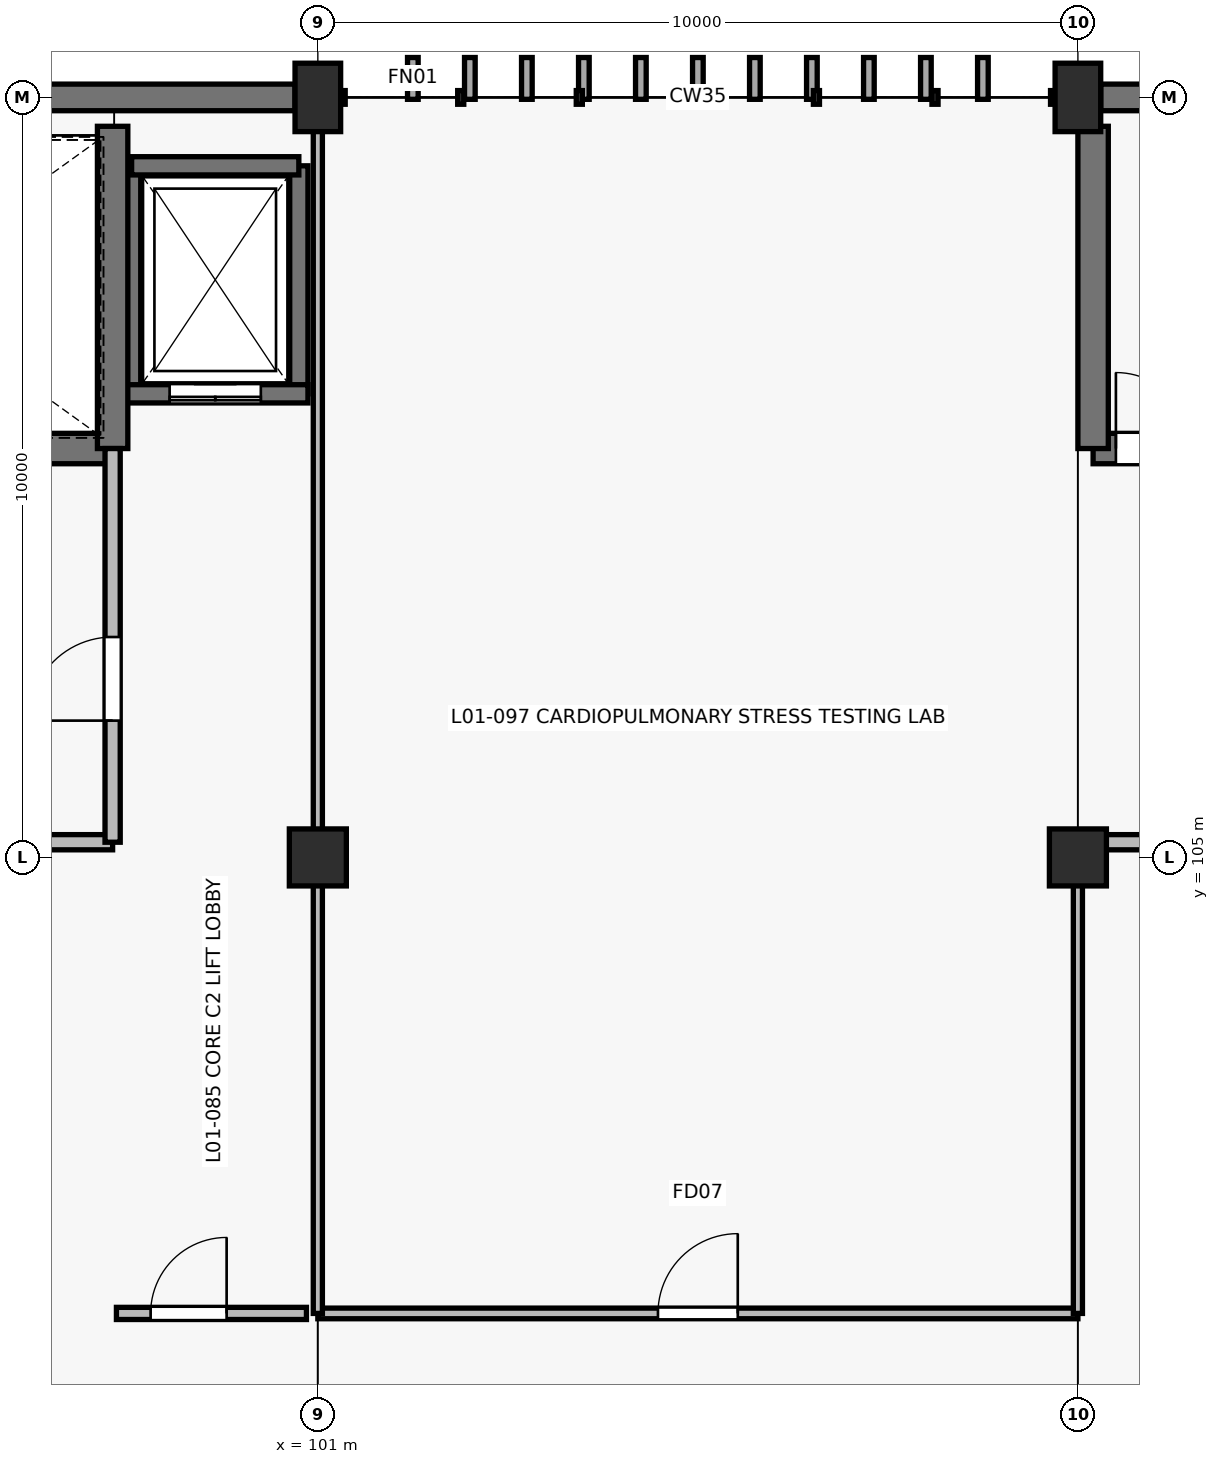
"""IFC4 building model, lengths in metres.
Left out: names, types, materials, properties, quantities, classifications, styles, units other than length and angle.
Written with IfcOpenShell. Run it as: python <this file> out.ifc"""

import sys

from ifc_helpers import new_model, si_unit, direction, frame, frame_2d, origin, origin_2d, place, context, subcontext, project, spatial, rectangle, extrude, element, fill, save


model = new_model("IFC4")
c1 = context("Model", 3, precision=1e-05, world=origin(), true_north=direction((0.0, 1.0)))
c2 = subcontext(c1, "Body", "Model", "MODEL_VIEW")
j1 = project(units=[si_unit("LENGTHUNIT", "METRE"), si_unit("PLANEANGLEUNIT", "RADIAN")], contexts=[c1])
p1 = place(None, origin())
s1 = spatial("IfcSite", under=j1, at=p1, CompositionType="ELEMENT")
p2 = place(p1, origin())
s2 = spatial("IfcBuilding", under=s1, at=p2, CompositionType="ELEMENT")
p3 = place(p2, frame((0.0, 0.0, 4.8)))
s3 = spatial("IfcBuildingStorey", under=s2, at=p3, CompositionType="ELEMENT", Elevation=4.8)
p4 = place(p3, frame((101.0, 105.0, 0.0), z_axis=(0.0, 0.0, 1.0), x_axis=(1.0, 0.0, 0.0)))
e1 = element("IfcColumn", 1, at=p4, inside=s3, PredefinedType="COLUMN", context=c2, shape_type="SweptSolid", body=[
    extrude(rectangle(XDim=0.75, YDim=0.75, at=origin_2d()), origin(), (0.0, 0.0, 1.0), 4.2),
])
p5 = place(p3, frame((101.0, 115.0, 0.0), z_axis=(0.0, 0.0, 1.0), x_axis=(1.0, 0.0, 0.0)))
e2 = element("IfcColumn", 2, at=p5, inside=s3, PredefinedType="COLUMN", context=c2, shape_type="SweptSolid", body=[
    extrude(rectangle(XDim=0.6, YDim=0.9, at=origin_2d()), origin(), (0.0, 0.0, 1.0), 4.2),
])
p6 = place(p3, frame((111.0, 105.0, 0.0), z_axis=(0.0, 0.0, 1.0), x_axis=(1.0, 0.0, 0.0)))
e3 = element("IfcColumn", 3, at=p6, inside=s3, PredefinedType="COLUMN", context=c2, shape_type="SweptSolid", body=[
    extrude(rectangle(XDim=0.75, YDim=0.75, at=origin_2d()), origin(), (0.0, 0.0, 1.0), 4.2),
])
p7 = place(p3, frame((111.0, 115.0, 0.0), z_axis=(0.0, 0.0, 1.0), x_axis=(1.0, 0.0, 0.0)))
e4 = element("IfcColumn", 4, at=p7, inside=s3, PredefinedType="COLUMN", context=c2, shape_type="SweptSolid", body=[
    extrude(rectangle(XDim=0.6, YDim=0.9, at=origin_2d()), origin(), (0.0, 0.0, 1.0), 4.2),
])
p8 = place(p3, frame((91.3, 115.0, 0.0), z_axis=(0.0, 0.0, 1.0), x_axis=(1.0, 0.0, 0.0)))
e5 = element("IfcWall", 5, at=p8, inside=s3, PredefinedType="SOLIDWALL", context=c2, shape_type="SweptSolid", body=[
    extrude(rectangle(XDim=9.4, YDim=0.35, at=frame_2d((4.7, 0.0))), origin(), (0.0, 0.0, 1.0), 4.2),
])
p9 = place(p8, frame((2.2, 0.0, 1.0)))
e6 = element("IfcOpeningElement", 6, at=p9, cuts=e5, PredefinedType="OPENING", context=c2, shape_type="SweptSolid", body=[
    extrude(rectangle(XDim=2.7, YDim=1.5, at=frame_2d((1.35, 0.75))), frame((0.0, 0.185, 0.0), z_axis=(0.0, -1.0, 0.0), x_axis=(1.0, 0.0, 0.0)), (0.0, 0.0, 1.0), 0.37),
])
p10 = place(p3, frame((111.3, 115.0, 0.0), z_axis=(0.0, 0.0, 1.0), x_axis=(1.0, 0.0, 0.0)))
e7 = element("IfcWall", 7, at=p10, inside=s3, PredefinedType="SOLIDWALL", context=c2, shape_type="SweptSolid", body=[
    extrude(rectangle(XDim=9.4, YDim=0.35, at=frame_2d((4.7, 0.0))), origin(), (0.0, 0.0, 1.0), 4.2),
])
p11 = place(p10, frame((2.2, 0.0, 1.0)))
e8 = element("IfcOpeningElement", 8, at=p11, cuts=e7, PredefinedType="OPENING", context=c2, shape_type="SweptSolid", body=[
    extrude(rectangle(XDim=1.5, YDim=1.8, at=frame_2d((0.75, 0.9))), frame((0.0, 0.185, 0.0), z_axis=(0.0, -1.0, 0.0), x_axis=(1.0, 0.0, 0.0)), (0.0, 0.0, 1.0), 0.37),
])
for number, where, z_axis, x_axis in (
    (9, (98.55, 111.1, 0.0), (0.0, 0.0, 1.0), (0.0, 1.0, 0.0)),
    (10, (100.75, 114.1, 0.0), (0.0, 0.0, 1.0), (0.0, -1.0, 0.0)),
):
    element("IfcWall", number, at=place(p3, frame(where, z_axis=z_axis, x_axis=x_axis)), inside=s3, PredefinedType="SHEAR", context=c2, shape_type="SweptSolid", body=[
        extrude(rectangle(XDim=3.0, YDim=0.24, at=frame_2d((1.5, 0.0))), origin(), (0.0, 0.0, 1.0), 4.2),
    ])
p12 = place(p3, frame((98.55, 114.1, 0.0), z_axis=(0.0, 0.0, 1.0), x_axis=(1.0, 0.0, 0.0)))
e11 = element("IfcWall", 11, at=p12, inside=s3, PredefinedType="SHEAR", context=c2, shape_type="SweptSolid", body=[
    extrude(rectangle(XDim=2.2, YDim=0.24, at=frame_2d((1.1, 0.0))), origin(), (0.0, 0.0, 1.0), 4.2),
])
p13 = place(p3, frame((100.87, 111.1, 0.0), z_axis=(0.0, 0.0, 1.0), x_axis=(-1.0, 0.0, 0.0)))
e12 = element("IfcWall", 12, at=p13, inside=s3, PredefinedType="SHEAR", context=c2, shape_type="SweptSolid", body=[
    extrude(rectangle(XDim=2.44, YDim=0.24, at=frame_2d((1.22, 0.0))), origin(), (0.0, 0.0, 1.0), 4.2),
])
p14 = place(p13, frame((0.62, 0.0, 0.0)))
e13 = element("IfcOpeningElement", 13, at=p14, cuts=e12, PredefinedType="OPENING", context=c2, shape_type="SweptSolid", body=[
    extrude(rectangle(XDim=1.2, YDim=2.15, at=frame_2d((0.6, 1.075))), frame((0.0, 0.13, 0.0), z_axis=(0.0, -1.0, 0.0), x_axis=(1.0, 0.0, 0.0)), (0.0, 0.0, 1.0), 0.26),
])
p15 = place(p3, frame((91.2, 110.38, 0.0), z_axis=(0.0, 0.0, 1.0), x_axis=(1.0, 0.0, 0.0)))
e14 = element("IfcWall", 14, at=p15, inside=s3, PredefinedType="SHEAR", context=c2, shape_type="SweptSolid", body=[
    extrude(rectangle(XDim=7.1, YDim=0.4, at=frame_2d((3.55, 0.0))), origin(), (0.0, 0.0, 1.0), 4.2),
])
p16 = place(p15, frame((0.3, 0.0, 0.0)))
e15 = element("IfcOpeningElement", 15, at=p16, cuts=e14, PredefinedType="OPENING", context=c2, shape_type="SweptSolid", body=[
    extrude(rectangle(XDim=1.0, YDim=2.15, at=frame_2d((0.5, 1.075))), frame((0.0, 0.21, 0.0), z_axis=(0.0, -1.0, 0.0), x_axis=(1.0, 0.0, 0.0)), (0.0, 0.0, 1.0), 0.42),
])
p17 = place(p3, frame((98.3, 110.38, 0.0), z_axis=(0.0, 0.0, 1.0), x_axis=(0.0, 1.0, 0.0)))
e16 = element("IfcWall", 16, at=p17, inside=s3, PredefinedType="SHEAR", context=c2, shape_type="SweptSolid", body=[
    extrude(rectangle(XDim=4.24, YDim=0.4, at=frame_2d((2.12, 0.0))), origin(), (0.0, 0.0, 1.0), 4.2),
])
p18 = place(p3, frame((91.2, 105.2, 0.0), z_axis=(0.0, 0.0, 1.0), x_axis=(1.0, 0.0, 0.0)))
e17 = element("IfcWall", 17, at=p18, inside=s3, PredefinedType="PARTITIONING", context=c2, shape_type="SweptSolid", body=[
    extrude(rectangle(XDim=7.1, YDim=0.2, at=frame_2d((3.55, 0.0))), origin(), (0.0, 0.0, 1.0), 2.925),
])
p19 = place(p18, frame((2.2, 0.0, 0.0)))
e18 = element("IfcOpeningElement", 18, at=p19, cuts=e17, PredefinedType="OPENING", context=c2, shape_type="SweptSolid", body=[
    extrude(rectangle(XDim=1.6, YDim=2.2, at=frame_2d((0.8, 1.1))), frame((0.0, 0.11, 0.0), z_axis=(0.0, -1.0, 0.0), x_axis=(1.0, 0.0, 0.0)), (0.0, 0.0, 1.0), 0.22),
])
p20 = place(p3, frame((98.3, 105.2, 0.0), z_axis=(0.0, 0.0, 1.0), x_axis=(0.0, 1.0, 0.0)))
e19 = element("IfcWall", 19, at=p20, inside=s3, PredefinedType="PARTITIONING", context=c2, shape_type="SweptSolid", body=[
    extrude(rectangle(XDim=5.18, YDim=0.2, at=frame_2d((2.59, 0.0))), origin(), (0.0, 0.0, 1.0), 3.025),
])
p21 = place(p20, frame((1.6, 0.0, 0.0)))
e20 = element("IfcOpeningElement", 20, at=p21, cuts=e19, PredefinedType="OPENING", context=c2, shape_type="SweptSolid", body=[
    extrude(rectangle(XDim=1.1, YDim=2.15, at=frame_2d((0.55, 1.075))), frame((0.0, 0.11, 0.0), z_axis=(0.0, -1.0, 0.0), x_axis=(1.0, 0.0, 0.0)), (0.0, 0.0, 1.0), 0.22),
])
p22 = place(p3, frame((98.35, 99.0, 0.0), z_axis=(0.0, 0.0, 1.0), x_axis=(1.0, 0.0, 0.0)))
e21 = element("IfcWall", 21, at=p22, inside=s3, PredefinedType="PARTITIONING", context=c2, shape_type="SweptSolid", body=[
    extrude(rectangle(XDim=2.5, YDim=0.16, at=frame_2d((1.25, 0.0))), origin(), (0.0, 0.0, 1.0), 2.925),
])
p23 = place(p22, frame((0.45, 0.0, 0.0)))
e22 = element("IfcOpeningElement", 22, at=p23, cuts=e21, PredefinedType="OPENING", context=c2, shape_type="SweptSolid", body=[
    extrude(rectangle(XDim=1.0, YDim=2.15, at=frame_2d((0.5, 1.075))), frame((0.0, 0.09, 0.0), z_axis=(0.0, -1.0, 0.0), x_axis=(1.0, 0.0, 0.0)), (0.0, 0.0, 1.0), 0.18),
])
p24 = place(p3, frame((111.2, 110.38, 0.0), z_axis=(0.0, 0.0, 1.0), x_axis=(1.0, 0.0, 0.0)))
e23 = element("IfcWall", 23, at=p24, inside=s3, PredefinedType="SHEAR", context=c2, shape_type="SweptSolid", body=[
    extrude(rectangle(XDim=7.1, YDim=0.4, at=frame_2d((3.55, 0.0))), origin(), (0.0, 0.0, 1.0), 4.2),
])
p25 = place(p24, frame((0.3, 0.0, 0.0)))
e24 = element("IfcOpeningElement", 24, at=p25, cuts=e23, PredefinedType="OPENING", context=c2, shape_type="SweptSolid", body=[
    extrude(rectangle(XDim=1.0, YDim=2.15, at=frame_2d((0.5, 1.075))), frame((0.0, 0.21, 0.0), z_axis=(0.0, -1.0, 0.0), x_axis=(1.0, 0.0, 0.0)), (0.0, 0.0, 1.0), 0.42),
])
p26 = place(p3, frame((111.2, 114.62, 0.0), z_axis=(0.0, 0.0, 1.0), x_axis=(0.0, -1.0, 0.0)))
e25 = element("IfcWall", 25, at=p26, inside=s3, PredefinedType="SHEAR", context=c2, shape_type="SweptSolid", body=[
    extrude(rectangle(XDim=4.24, YDim=0.4, at=frame_2d((2.12, 0.0))), origin(), (0.0, 0.0, 1.0), 4.2),
])
p27 = place(p3, frame((111.2, 105.2, 0.0), z_axis=(0.0, 0.0, 1.0), x_axis=(1.0, 0.0, 0.0)))
e26 = element("IfcWall", 26, at=p27, inside=s3, PredefinedType="PARTITIONING", context=c2, shape_type="SweptSolid", body=[
    extrude(rectangle(XDim=7.1, YDim=0.2, at=frame_2d((3.55, 0.0))), origin(), (0.0, 0.0, 1.0), 2.925),
])
p28 = place(p27, frame((2.2, 0.0, 0.0)))
e27 = element("IfcOpeningElement", 27, at=p28, cuts=e26, PredefinedType="OPENING", context=c2, shape_type="SweptSolid", body=[
    extrude(rectangle(XDim=1.6, YDim=2.2, at=frame_2d((0.8, 1.1))), frame((0.0, 0.11, 0.0), z_axis=(0.0, -1.0, 0.0), x_axis=(1.0, 0.0, 0.0)), (0.0, 0.0, 1.0), 0.22),
])
p29 = place(p3, frame((101.0, 99.0, 0.0), z_axis=(0.0, 0.0, 1.0), x_axis=(1.0, 0.0, 0.0)))
e28 = element("IfcWall", 28, at=p29, inside=s3, PredefinedType="PARTITIONING", context=c2, shape_type="SweptSolid", body=[
    extrude(rectangle(XDim=10.0, YDim=0.14, at=frame_2d((5.0, 0.0))), origin(), (0.0, 0.0, 1.0), 2.925),
])
p30 = place(p29, frame((4.475, 0.0, 0.0)))
e29 = element("IfcOpeningElement", 29, at=p30, cuts=e28, PredefinedType="OPENING", context=c2, shape_type="SweptSolid", body=[
    extrude(rectangle(XDim=1.05, YDim=2.1, at=frame_2d((0.525, 1.05))), frame((0.0, 0.08, 0.0), z_axis=(0.0, -1.0, 0.0), x_axis=(1.0, 0.0, 0.0)), (0.0, 0.0, 1.0), 0.16),
])
p31 = place(p3, frame((101.0, 99.0, 0.0), z_axis=(0.0, 0.0, 1.0), x_axis=(0.0, 1.0, 0.0)))
e30 = element("IfcWall", 30, at=p31, inside=s3, PredefinedType="PARTITIONING", context=c2, shape_type="SweptSolid", body=[
    extrude(rectangle(XDim=15.75, YDim=0.12, at=frame_2d((7.875, 0.0))), origin(), (0.0, 0.0, 1.0), 2.925),
])
p32 = place(p3, frame((111.0, 99.0, 0.0), z_axis=(0.0, 0.0, 1.0), x_axis=(0.0, 1.0, 0.0)))
e31 = element("IfcWall", 31, at=p32, inside=s3, PredefinedType="PARTITIONING", context=c2, shape_type="SweptSolid", body=[
    extrude(rectangle(XDim=6.2, YDim=0.12, at=frame_2d((3.1, 0.0))), origin(), (0.0, 0.0, 1.0), 2.925),
])
p33 = place(p14, origin())
e32 = element("IfcDoor", 32, at=p33, inside=s3, OperationType="DOUBLE_DOOR_SLIDING", PredefinedType="USERDEFINED", context=c2, shape_type="SweptSolid", body=[
    extrude(rectangle(XDim=1.2, YDim=2.15, at=frame_2d((0.6, 1.075))), frame((0.0, 0.025, 0.0), z_axis=(0.0, -1.0, 0.0), x_axis=(1.0, 0.0, 0.0)), (0.0, 0.0, 1.0), 0.05),
])
fill(e13, e32)
p34 = place(p21, origin())
e33 = element("IfcDoor", 33, at=p34, inside=s3, OperationType="SINGLE_SWING_LEFT", PredefinedType="DOOR", context=c2, shape_type="SweptSolid", body=[
    extrude(rectangle(XDim=1.1, YDim=2.15, at=frame_2d((0.55, 1.075))), frame((0.0, 0.025, 0.0), z_axis=(0.0, -1.0, 0.0), x_axis=(1.0, 0.0, 0.0)), (0.0, 0.0, 1.0), 0.05),
])
fill(e20, e33)
p35 = place(p23, origin())
e34 = element("IfcDoor", 34, at=p35, inside=s3, OperationType="SINGLE_SWING_RIGHT", PredefinedType="DOOR", context=c2, shape_type="SweptSolid", body=[
    extrude(rectangle(XDim=1.0, YDim=2.15, at=frame_2d((0.5, 1.075))), frame((0.0, 0.025, 0.0), z_axis=(0.0, -1.0, 0.0), x_axis=(1.0, 0.0, 0.0)), (0.0, 0.0, 1.0), 0.05),
])
fill(e22, e34)
p36 = place(p25, origin())
e35 = element("IfcDoor", 35, at=p36, inside=s3, OperationType="SINGLE_SWING_LEFT", PredefinedType="DOOR", context=c2, shape_type="SweptSolid", body=[
    extrude(rectangle(XDim=1.0, YDim=2.15, at=frame_2d((0.5, 1.075))), frame((0.0, 0.025, 0.0), z_axis=(0.0, -1.0, 0.0), x_axis=(1.0, 0.0, 0.0)), (0.0, 0.0, 1.0), 0.05),
])
fill(e24, e35)
p37 = place(p30, origin())
e36 = element("IfcDoor", 36, at=p37, inside=s3, OperationType="SINGLE_SWING_RIGHT", PredefinedType="DOOR", context=c2, shape_type="SweptSolid", body=[
    extrude(rectangle(XDim=1.05, YDim=2.1, at=frame_2d((0.525, 1.05))), frame((0.0, 0.025, 0.0), z_axis=(0.0, -1.0, 0.0), x_axis=(1.0, 0.0, 0.0)), (0.0, 0.0, 1.0), 0.05),
])
fill(e29, e36)
save(model, sys.argv[1])
